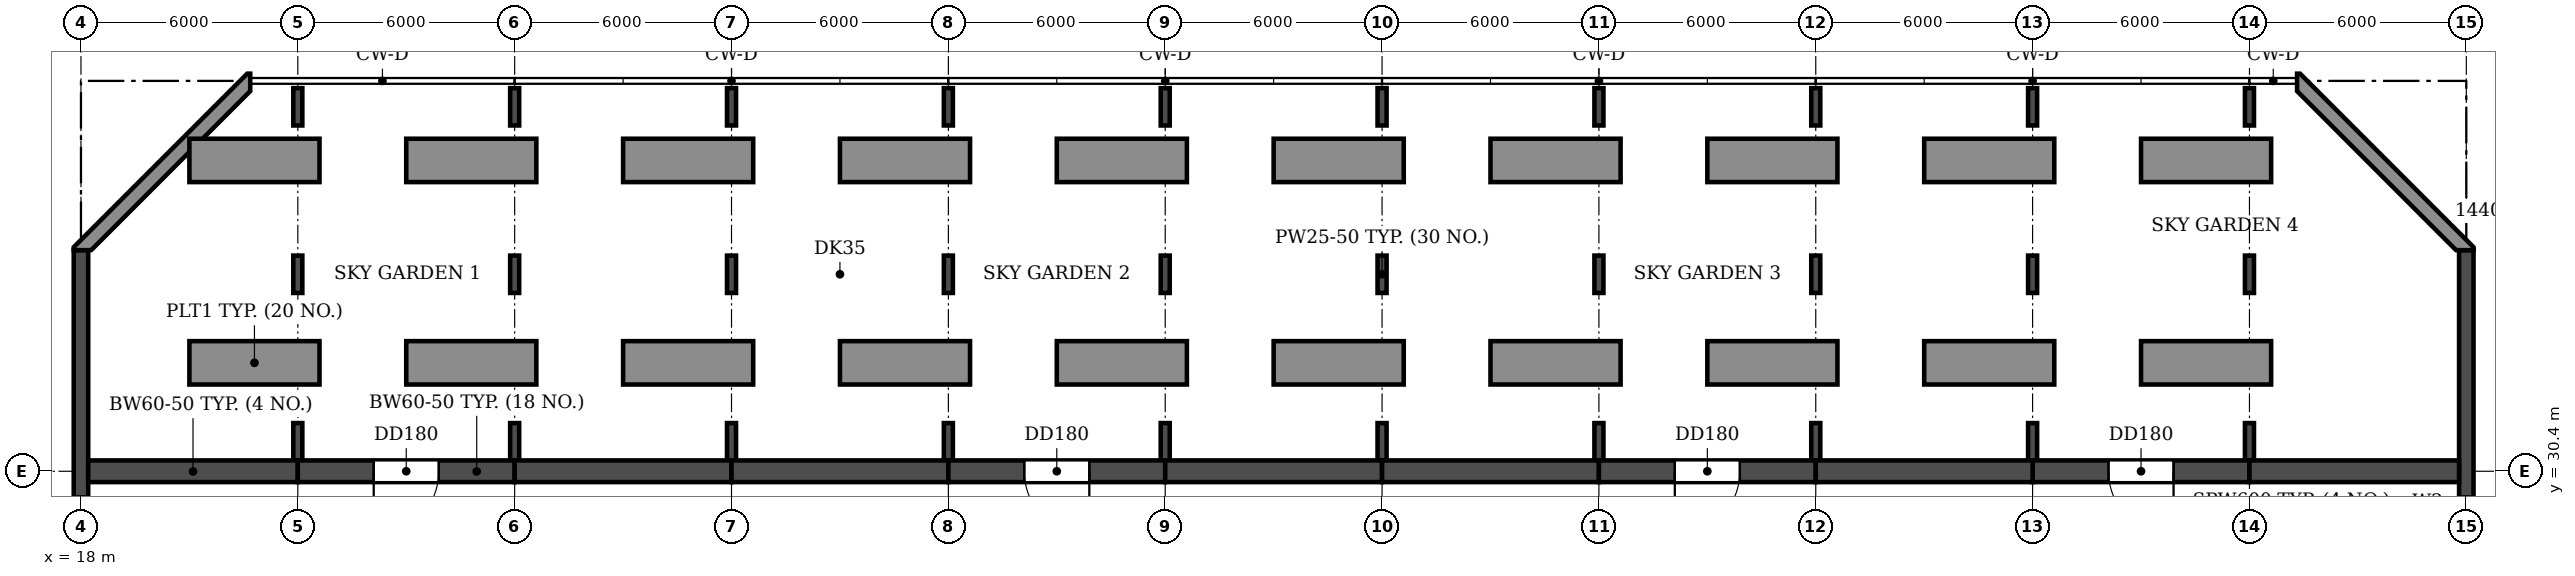
"""IFC4 building model, lengths in metres.
Left out: names, types, materials, properties, quantities, classifications, styles, units other than length and angle.
Written with IfcOpenShell. Run it as: python <this file> out.ifc"""

import sys

from ifc_helpers import new_model, si_unit, direction, frame, frame_2d, origin, place, context, subcontext, project, spatial, polyline, rectangle, outline, extrude, source, transform, mapped, element, fill, save


model = new_model("IFC4")
c1 = context("Model", 3, precision=1e-05, world=origin(), true_north=direction((0.0, 1.0)))
c2 = subcontext(c1, "Body", "Model", "MODEL_VIEW")
j1 = project(units=[si_unit("LENGTHUNIT", "METRE"), si_unit("PLANEANGLEUNIT", "RADIAN")], contexts=[c1])
p1 = place(None, origin())
s1 = spatial("IfcSite", under=j1, at=p1, CompositionType="ELEMENT")
p2 = place(p1, origin())
s2 = spatial("IfcBuilding", under=s1, at=p2, CompositionType="ELEMENT")
p3 = place(p2, frame((0.0, 0.0, 214.8)))
s3 = spatial("IfcBuildingStorey", under=s2, at=p3, CompositionType="ELEMENT", Elevation=214.8)
for number, where, z_axis, x_axis in (
    (1, (24.0, 30.7, 0.0), (0.0, 0.0, 1.0), (0.0, 1.0, 0.0)),
    (2, (24.0, 35.333, 0.0), (0.0, 0.0, 1.0), (0.0, 1.0, 0.0)),
):
    element("IfcWall", number, at=place(p3, frame(where, z_axis=z_axis, x_axis=x_axis)), inside=s3, PredefinedType="SHEAR", context=c2, shape_type="SweptSolid", body=[
        extrude(rectangle(XDim=1.033, YDim=0.25, at=frame_2d((0.517, 0.0))), origin(), (0.0, 0.0, 1.0), 6.38),
    ])
p4 = place(p3, frame((24.0, 39.967, 0.0), z_axis=(0.0, 0.0, 1.0), x_axis=(0.0, 1.0, 0.0)))
e3 = element("IfcWall", 3, at=p4, inside=s3, PredefinedType="SHEAR", context=c2, shape_type="SweptSolid", body=[
    extrude(rectangle(XDim=1.033, YDim=0.25, at=frame_2d((0.517, 0.0))), origin(), (0.0, 0.0, 1.0), 6.38),
])
for number, where, z_axis, x_axis in (
    (4, (30.0, 30.7, 0.0), (0.0, 0.0, 1.0), (0.0, 1.0, 0.0)),
    (5, (30.0, 35.333, 0.0), (0.0, 0.0, 1.0), (0.0, 1.0, 0.0)),
):
    element("IfcWall", number, at=place(p3, frame(where, z_axis=z_axis, x_axis=x_axis)), inside=s3, PredefinedType="SHEAR", context=c2, shape_type="SweptSolid", body=[
        extrude(rectangle(XDim=1.033, YDim=0.25, at=frame_2d((0.517, 0.0))), origin(), (0.0, 0.0, 1.0), 6.38),
    ])
p5 = place(p3, frame((30.0, 39.967, 0.0), z_axis=(0.0, 0.0, 1.0), x_axis=(0.0, 1.0, 0.0)))
e6 = element("IfcWall", 6, at=p5, inside=s3, PredefinedType="SHEAR", context=c2, shape_type="SweptSolid", body=[
    extrude(rectangle(XDim=1.033, YDim=0.25, at=frame_2d((0.517, 0.0))), origin(), (0.0, 0.0, 1.0), 6.38),
])
for number, where, z_axis, x_axis in (
    (7, (36.0, 30.7, 0.0), (0.0, 0.0, 1.0), (0.0, 1.0, 0.0)),
    (8, (36.0, 35.333, 0.0), (0.0, 0.0, 1.0), (0.0, 1.0, 0.0)),
):
    element("IfcWall", number, at=place(p3, frame(where, z_axis=z_axis, x_axis=x_axis)), inside=s3, PredefinedType="SHEAR", context=c2, shape_type="SweptSolid", body=[
        extrude(rectangle(XDim=1.033, YDim=0.25, at=frame_2d((0.517, 0.0))), origin(), (0.0, 0.0, 1.0), 6.38),
    ])
p6 = place(p3, frame((36.0, 39.967, 0.0), z_axis=(0.0, 0.0, 1.0), x_axis=(0.0, 1.0, 0.0)))
e9 = element("IfcWall", 9, at=p6, inside=s3, PredefinedType="SHEAR", context=c2, shape_type="SweptSolid", body=[
    extrude(rectangle(XDim=1.033, YDim=0.25, at=frame_2d((0.517, 0.0))), origin(), (0.0, 0.0, 1.0), 6.38),
])
for number, where, z_axis, x_axis in (
    (10, (42.0, 30.7, 0.0), (0.0, 0.0, 1.0), (0.0, 1.0, 0.0)),
    (11, (42.0, 35.333, 0.0), (0.0, 0.0, 1.0), (0.0, 1.0, 0.0)),
):
    element("IfcWall", number, at=place(p3, frame(where, z_axis=z_axis, x_axis=x_axis)), inside=s3, PredefinedType="SHEAR", context=c2, shape_type="SweptSolid", body=[
        extrude(rectangle(XDim=1.033, YDim=0.25, at=frame_2d((0.517, 0.0))), origin(), (0.0, 0.0, 1.0), 6.38),
    ])
p7 = place(p3, frame((42.0, 39.967, 0.0), z_axis=(0.0, 0.0, 1.0), x_axis=(0.0, 1.0, 0.0)))
e12 = element("IfcWall", 12, at=p7, inside=s3, PredefinedType="SHEAR", context=c2, shape_type="SweptSolid", body=[
    extrude(rectangle(XDim=1.033, YDim=0.25, at=frame_2d((0.517, 0.0))), origin(), (0.0, 0.0, 1.0), 6.38),
])
for number, where, z_axis, x_axis in (
    (13, (48.0, 30.7, 0.0), (0.0, 0.0, 1.0), (0.0, 1.0, 0.0)),
    (14, (48.0, 35.333, 0.0), (0.0, 0.0, 1.0), (0.0, 1.0, 0.0)),
):
    element("IfcWall", number, at=place(p3, frame(where, z_axis=z_axis, x_axis=x_axis)), inside=s3, PredefinedType="SHEAR", context=c2, shape_type="SweptSolid", body=[
        extrude(rectangle(XDim=1.033, YDim=0.25, at=frame_2d((0.517, 0.0))), origin(), (0.0, 0.0, 1.0), 6.38),
    ])
p8 = place(p3, frame((48.0, 39.967, 0.0), z_axis=(0.0, 0.0, 1.0), x_axis=(0.0, 1.0, 0.0)))
e15 = element("IfcWall", 15, at=p8, inside=s3, PredefinedType="SHEAR", context=c2, shape_type="SweptSolid", body=[
    extrude(rectangle(XDim=1.033, YDim=0.25, at=frame_2d((0.517, 0.0))), origin(), (0.0, 0.0, 1.0), 6.38),
])
for number, where, z_axis, x_axis in (
    (16, (54.0, 30.7, 0.0), (0.0, 0.0, 1.0), (0.0, 1.0, 0.0)),
    (17, (54.0, 35.333, 0.0), (0.0, 0.0, 1.0), (0.0, 1.0, 0.0)),
):
    element("IfcWall", number, at=place(p3, frame(where, z_axis=z_axis, x_axis=x_axis)), inside=s3, PredefinedType="SHEAR", context=c2, shape_type="SweptSolid", body=[
        extrude(rectangle(XDim=1.033, YDim=0.25, at=frame_2d((0.517, 0.0))), origin(), (0.0, 0.0, 1.0), 6.38),
    ])
p9 = place(p3, frame((54.0, 39.967, 0.0), z_axis=(0.0, 0.0, 1.0), x_axis=(0.0, 1.0, 0.0)))
e18 = element("IfcWall", 18, at=p9, inside=s3, PredefinedType="SHEAR", context=c2, shape_type="SweptSolid", body=[
    extrude(rectangle(XDim=1.033, YDim=0.25, at=frame_2d((0.517, 0.0))), origin(), (0.0, 0.0, 1.0), 6.38),
])
for number, where, z_axis, x_axis in (
    (19, (60.0, 30.7, 0.0), (0.0, 0.0, 1.0), (0.0, 1.0, 0.0)),
    (20, (60.0, 35.333, 0.0), (0.0, 0.0, 1.0), (0.0, 1.0, 0.0)),
):
    element("IfcWall", number, at=place(p3, frame(where, z_axis=z_axis, x_axis=x_axis)), inside=s3, PredefinedType="SHEAR", context=c2, shape_type="SweptSolid", body=[
        extrude(rectangle(XDim=1.033, YDim=0.25, at=frame_2d((0.517, 0.0))), origin(), (0.0, 0.0, 1.0), 6.38),
    ])
p10 = place(p3, frame((60.0, 39.967, 0.0), z_axis=(0.0, 0.0, 1.0), x_axis=(0.0, 1.0, 0.0)))
e21 = element("IfcWall", 21, at=p10, inside=s3, PredefinedType="SHEAR", context=c2, shape_type="SweptSolid", body=[
    extrude(rectangle(XDim=1.033, YDim=0.25, at=frame_2d((0.517, 0.0))), origin(), (0.0, 0.0, 1.0), 6.38),
])
for number, where, z_axis, x_axis in (
    (22, (66.0, 30.7, 0.0), (0.0, 0.0, 1.0), (0.0, 1.0, 0.0)),
    (23, (66.0, 35.333, 0.0), (0.0, 0.0, 1.0), (0.0, 1.0, 0.0)),
):
    element("IfcWall", number, at=place(p3, frame(where, z_axis=z_axis, x_axis=x_axis)), inside=s3, PredefinedType="SHEAR", context=c2, shape_type="SweptSolid", body=[
        extrude(rectangle(XDim=1.033, YDim=0.25, at=frame_2d((0.517, 0.0))), origin(), (0.0, 0.0, 1.0), 6.38),
    ])
p11 = place(p3, frame((66.0, 39.967, 0.0), z_axis=(0.0, 0.0, 1.0), x_axis=(0.0, 1.0, 0.0)))
e24 = element("IfcWall", 24, at=p11, inside=s3, PredefinedType="SHEAR", context=c2, shape_type="SweptSolid", body=[
    extrude(rectangle(XDim=1.033, YDim=0.25, at=frame_2d((0.517, 0.0))), origin(), (0.0, 0.0, 1.0), 6.38),
])
for number, where, z_axis, x_axis in (
    (25, (72.0, 30.7, 0.0), (0.0, 0.0, 1.0), (0.0, 1.0, 0.0)),
    (26, (72.0, 35.333, 0.0), (0.0, 0.0, 1.0), (0.0, 1.0, 0.0)),
):
    element("IfcWall", number, at=place(p3, frame(where, z_axis=z_axis, x_axis=x_axis)), inside=s3, PredefinedType="SHEAR", context=c2, shape_type="SweptSolid", body=[
        extrude(rectangle(XDim=1.033, YDim=0.25, at=frame_2d((0.517, 0.0))), origin(), (0.0, 0.0, 1.0), 6.38),
    ])
p12 = place(p3, frame((72.0, 39.967, 0.0), z_axis=(0.0, 0.0, 1.0), x_axis=(0.0, 1.0, 0.0)))
e27 = element("IfcWall", 27, at=p12, inside=s3, PredefinedType="SHEAR", context=c2, shape_type="SweptSolid", body=[
    extrude(rectangle(XDim=1.033, YDim=0.25, at=frame_2d((0.517, 0.0))), origin(), (0.0, 0.0, 1.0), 6.38),
])
for number, where, z_axis, x_axis in (
    (28, (78.0, 30.7, 0.0), (0.0, 0.0, 1.0), (0.0, 1.0, 0.0)),
    (29, (78.0, 35.333, 0.0), (0.0, 0.0, 1.0), (0.0, 1.0, 0.0)),
):
    element("IfcWall", number, at=place(p3, frame(where, z_axis=z_axis, x_axis=x_axis)), inside=s3, PredefinedType="SHEAR", context=c2, shape_type="SweptSolid", body=[
        extrude(rectangle(XDim=1.033, YDim=0.25, at=frame_2d((0.517, 0.0))), origin(), (0.0, 0.0, 1.0), 6.38),
    ])
p13 = place(p3, frame((78.0, 39.967, 0.0), z_axis=(0.0, 0.0, 1.0), x_axis=(0.0, 1.0, 0.0)))
e30 = element("IfcWall", 30, at=p13, inside=s3, PredefinedType="SHEAR", context=c2, shape_type="SweptSolid", body=[
    extrude(rectangle(XDim=1.033, YDim=0.25, at=frame_2d((0.517, 0.0))), origin(), (0.0, 0.0, 1.0), 6.38),
])
p14 = place(p3, frame((18.0, 4.683, 0.0), z_axis=(0.0, 0.0, 1.0), x_axis=(0.0, 1.0, 0.0)))
e31 = element("IfcWall", 31, at=p14, inside=s3, PredefinedType="SHEAR", context=c2, shape_type="SweptSolid", body=[
    extrude(rectangle(XDim=31.834, YDim=0.4, at=frame_2d((15.917, 0.0))), origin(), (0.0, 0.0, 1.0), 6.38),
])
p15 = place(p14, frame((23.817, 0.0, 0.9)))
e32 = element("IfcOpeningElement", 32, at=p15, cuts=e31, PredefinedType="OPENING", context=c2, shape_type="SweptSolid", body=[
    extrude(rectangle(XDim=1.2, YDim=1.5, at=frame_2d((0.6, 0.75))), frame((0.0, 0.21, 0.0), z_axis=(0.0, -1.0, 0.0), x_axis=(1.0, 0.0, 0.0)), (0.0, 0.0, 1.0), 0.42),
])
p16 = place(p14, frame((8.017, 0.0, 0.9)))
e33 = element("IfcOpeningElement", 33, at=p16, cuts=e31, PredefinedType="OPENING", context=c2, shape_type="SweptSolid", body=[
    extrude(rectangle(XDim=1.2, YDim=1.5, at=frame_2d((0.6, 0.75))), frame((0.0, 0.21, 0.0), z_axis=(0.0, -1.0, 0.0), x_axis=(1.0, 0.0, 0.0)), (0.0, 0.0, 1.0), 0.42),
])
p17 = place(p14, frame((15.917, 0.0, 0.9)))
e34 = element("IfcOpeningElement", 34, at=p17, cuts=e31, PredefinedType="OPENING", context=c2, shape_type="SweptSolid", body=[
    extrude(rectangle(XDim=1.2, YDim=1.5, at=frame_2d((0.6, 0.75))), frame((0.0, 0.21, 0.0), z_axis=(0.0, -1.0, 0.0), x_axis=(1.0, 0.0, 0.0)), (0.0, 0.0, 1.0), 0.42),
])
p18 = place(p3, frame((84.0, 4.683, 0.0), z_axis=(0.0, 0.0, 1.0), x_axis=(0.0, 1.0, 0.0)))
e35 = element("IfcWall", 35, at=p18, inside=s3, PredefinedType="SHEAR", context=c2, shape_type="SweptSolid", body=[
    extrude(rectangle(XDim=31.834, YDim=0.4, at=frame_2d((15.917, 0.0))), origin(), (0.0, 0.0, 1.0), 6.38),
])
p19 = place(p18, frame((23.817, 0.0, 0.9)))
e36 = element("IfcOpeningElement", 36, at=p19, cuts=e35, PredefinedType="OPENING", context=c2, shape_type="SweptSolid", body=[
    extrude(rectangle(XDim=1.2, YDim=1.5, at=frame_2d((0.6, 0.75))), frame((0.0, 0.21, 0.0), z_axis=(0.0, -1.0, 0.0), x_axis=(1.0, 0.0, 0.0)), (0.0, 0.0, 1.0), 0.42),
])
p20 = place(p18, frame((8.017, 0.0, 0.9)))
e37 = element("IfcOpeningElement", 37, at=p20, cuts=e35, PredefinedType="OPENING", context=c2, shape_type="SweptSolid", body=[
    extrude(rectangle(XDim=1.2, YDim=1.5, at=frame_2d((0.6, 0.75))), frame((0.0, 0.21, 0.0), z_axis=(0.0, -1.0, 0.0), x_axis=(1.0, 0.0, 0.0)), (0.0, 0.0, 1.0), 0.42),
])
p21 = place(p18, frame((15.917, 0.0, 0.9)))
e38 = element("IfcOpeningElement", 38, at=p21, cuts=e35, PredefinedType="OPENING", context=c2, shape_type="SweptSolid", body=[
    extrude(rectangle(XDim=1.2, YDim=1.5, at=frame_2d((0.6, 0.75))), frame((0.0, 0.21, 0.0), z_axis=(0.0, -1.0, 0.0), x_axis=(1.0, 0.0, 0.0)), (0.0, 0.0, 1.0), 0.42),
])
p22 = place(p3, frame((18.2, 30.4, 0.0), z_axis=(0.0, 0.0, 1.0), x_axis=(1.0, 0.0, 0.0)))
e39 = element("IfcWall", 39, at=p22, inside=s3, PredefinedType="SHEAR", context=c2, shape_type="SweptSolid", body=[
    extrude(rectangle(XDim=5.8, YDim=0.6, at=frame_2d((2.9, 0.0))), origin(), (0.0, 0.0, 1.0), 6.38),
])
p23 = place(p3, frame((24.0, 30.4, 0.0), z_axis=(0.0, 0.0, 1.0), x_axis=(1.0, 0.0, 0.0)))
e40 = element("IfcWall", 40, at=p23, inside=s3, PredefinedType="SHEAR", context=c2, shape_type="SweptSolid", body=[
    extrude(rectangle(XDim=6.0, YDim=0.6, at=frame_2d((3.0, 0.0))), origin(), (0.0, 0.0, 1.0), 6.38),
])
p24 = place(p23, frame((2.1, 0.0, 0.0)))
e41 = element("IfcOpeningElement", 41, at=p24, cuts=e40, PredefinedType="OPENING", context=c2, shape_type="SweptSolid", body=[
    extrude(rectangle(XDim=1.8, YDim=2.1, at=frame_2d((0.9, 1.05))), frame((0.0, 0.31, 0.0), z_axis=(0.0, -1.0, 0.0), x_axis=(1.0, 0.0, 0.0)), (0.0, 0.0, 1.0), 0.62),
])
for number, where, z_axis, x_axis in (
    (42, (30.0, 30.4, 0.0), (0.0, 0.0, 1.0), (1.0, 0.0, 0.0)),
    (43, (36.0, 30.4, 0.0), (0.0, 0.0, 1.0), (1.0, 0.0, 0.0)),
):
    element("IfcWall", number, at=place(p3, frame(where, z_axis=z_axis, x_axis=x_axis)), inside=s3, PredefinedType="SHEAR", context=c2, shape_type="SweptSolid", body=[
        extrude(rectangle(XDim=6.0, YDim=0.6, at=frame_2d((3.0, 0.0))), origin(), (0.0, 0.0, 1.0), 6.38),
    ])
p25 = place(p3, frame((42.0, 30.4, 0.0), z_axis=(0.0, 0.0, 1.0), x_axis=(1.0, 0.0, 0.0)))
e44 = element("IfcWall", 44, at=p25, inside=s3, PredefinedType="SHEAR", context=c2, shape_type="SweptSolid", body=[
    extrude(rectangle(XDim=6.0, YDim=0.6, at=frame_2d((3.0, 0.0))), origin(), (0.0, 0.0, 1.0), 6.38),
])
p26 = place(p25, frame((2.1, 0.0, 0.0)))
e45 = element("IfcOpeningElement", 45, at=p26, cuts=e44, PredefinedType="OPENING", context=c2, shape_type="SweptSolid", body=[
    extrude(rectangle(XDim=1.8, YDim=2.1, at=frame_2d((0.9, 1.05))), frame((0.0, 0.31, 0.0), z_axis=(0.0, -1.0, 0.0), x_axis=(1.0, 0.0, 0.0)), (0.0, 0.0, 1.0), 0.62),
])
for number, where, z_axis, x_axis in (
    (46, (48.0, 30.4, 0.0), (0.0, 0.0, 1.0), (1.0, 0.0, 0.0)),
    (47, (54.0, 30.4, 0.0), (0.0, 0.0, 1.0), (1.0, 0.0, 0.0)),
):
    element("IfcWall", number, at=place(p3, frame(where, z_axis=z_axis, x_axis=x_axis)), inside=s3, PredefinedType="SHEAR", context=c2, shape_type="SweptSolid", body=[
        extrude(rectangle(XDim=6.0, YDim=0.6, at=frame_2d((3.0, 0.0))), origin(), (0.0, 0.0, 1.0), 6.38),
    ])
p27 = place(p3, frame((60.0, 30.4, 0.0), z_axis=(0.0, 0.0, 1.0), x_axis=(1.0, 0.0, 0.0)))
e48 = element("IfcWall", 48, at=p27, inside=s3, PredefinedType="SHEAR", context=c2, shape_type="SweptSolid", body=[
    extrude(rectangle(XDim=6.0, YDim=0.6, at=frame_2d((3.0, 0.0))), origin(), (0.0, 0.0, 1.0), 6.38),
])
p28 = place(p27, frame((2.1, 0.0, 0.0)))
e49 = element("IfcOpeningElement", 49, at=p28, cuts=e48, PredefinedType="OPENING", context=c2, shape_type="SweptSolid", body=[
    extrude(rectangle(XDim=1.8, YDim=2.1, at=frame_2d((0.9, 1.05))), frame((0.0, 0.31, 0.0), z_axis=(0.0, -1.0, 0.0), x_axis=(1.0, 0.0, 0.0)), (0.0, 0.0, 1.0), 0.62),
])
p29 = place(p3, frame((66.0, 30.4, 0.0), z_axis=(0.0, 0.0, 1.0), x_axis=(1.0, 0.0, 0.0)))
e50 = element("IfcWall", 50, at=p29, inside=s3, PredefinedType="SHEAR", context=c2, shape_type="SweptSolid", body=[
    extrude(rectangle(XDim=6.0, YDim=0.6, at=frame_2d((3.0, 0.0))), origin(), (0.0, 0.0, 1.0), 6.38),
])
p30 = place(p3, frame((72.0, 30.4, 0.0), z_axis=(0.0, 0.0, 1.0), x_axis=(1.0, 0.0, 0.0)))
e51 = element("IfcWall", 51, at=p30, inside=s3, PredefinedType="SHEAR", context=c2, shape_type="SweptSolid", body=[
    extrude(rectangle(XDim=6.0, YDim=0.6, at=frame_2d((3.0, 0.0))), origin(), (0.0, 0.0, 1.0), 6.38),
])
p31 = place(p30, frame((2.1, 0.0, 0.0)))
e52 = element("IfcOpeningElement", 52, at=p31, cuts=e51, PredefinedType="OPENING", context=c2, shape_type="SweptSolid", body=[
    extrude(rectangle(XDim=1.8, YDim=2.1, at=frame_2d((0.9, 1.05))), frame((0.0, 0.31, 0.0), z_axis=(0.0, -1.0, 0.0), x_axis=(1.0, 0.0, 0.0)), (0.0, 0.0, 1.0), 0.62),
])
p32 = place(p3, frame((78.0, 30.4, 0.0), z_axis=(0.0, 0.0, 1.0), x_axis=(1.0, 0.0, 0.0)))
e53 = element("IfcWall", 53, at=p32, inside=s3, PredefinedType="SHEAR", context=c2, shape_type="SweptSolid", body=[
    extrude(rectangle(XDim=5.8, YDim=0.6, at=frame_2d((2.9, 0.0))), origin(), (0.0, 0.0, 1.0), 6.38),
])
p33 = place(p3, origin())
e54 = element("IfcWall", 54, at=p33, inside=s3, PredefinedType="STANDARD", context=c2, shape_type="SweptSolid", body=[
    extrude(outline(polyline([(84.2, 36.517), (84.2, 36.6), (79.4, 41.4), (79.317, 41.4), (79.317, 40.917), (83.717, 36.517), (84.2, 36.517)])), origin(), (0.0, 0.0, 1.0), 6.38),
])
p34 = place(p3, origin())
e55 = element("IfcWall", 55, at=p34, inside=s3, PredefinedType="STANDARD", context=c2, shape_type="SweptSolid", body=[
    extrude(outline(polyline([(22.683, 41.4), (22.6, 41.4), (17.8, 36.6), (17.8, 36.517), (18.283, 36.517), (22.683, 40.917), (22.683, 41.4)])), origin(), (0.0, 0.0, 1.0), 6.38),
])
m1 = source(origin(), c2, "Body", "SweptSolid", [
    extrude(outline(polyline([(0.0, 0.0), (3.6, 0.0), (3.6, 1.2), (0.0, 1.2), (0.0, 0.0)])), origin(), (0.0, 0.0, 1.0), 0.6),
])
for number, where in (
    (56, (21.0, 32.8, 0.0)),
    (57, (27.0, 32.8, 0.0)),
    (58, (33.0, 32.8, 0.0)),
    (59, (39.0, 32.8, 0.0)),
    (60, (45.0, 32.8, 0.0)),
    (61, (51.0, 32.8, 0.0)),
    (62, (57.0, 32.8, 0.0)),
    (63, (63.0, 32.8, 0.0)),
    (64, (69.0, 32.8, 0.0)),
    (65, (75.0, 32.8, 0.0)),
):
    element("IfcWall", number, at=place(p3, frame(where)), inside=s3, PredefinedType="USERDEFINED", context=c2, shape_type="MappedRepresentation", body=[
        mapped(m1, transform((0.0, 0.0, 0.0))),
    ])
m2 = source(origin(), c2, "Body", "SweptSolid", [
    extrude(outline(polyline([(0.0, 0.0), (3.6, 0.0), (3.6, 1.2), (0.0, 1.2), (0.0, 0.0)])), origin(), (0.0, 0.0, 1.0), 0.6),
])
for number, where in (
    (66, (21.0, 38.4, 0.0)),
    (67, (27.0, 38.4, 0.0)),
    (68, (33.0, 38.4, 0.0)),
    (69, (39.0, 38.4, 0.0)),
    (70, (45.0, 38.4, 0.0)),
    (71, (51.0, 38.4, 0.0)),
    (72, (57.0, 38.4, 0.0)),
    (73, (63.0, 38.4, 0.0)),
    (74, (69.0, 38.4, 0.0)),
    (75, (75.0, 38.4, 0.0)),
):
    element("IfcWall", number, at=place(p3, frame(where)), inside=s3, PredefinedType="USERDEFINED", context=c2, shape_type="MappedRepresentation", body=[
        mapped(m2, transform((0.0, 0.0, 0.0))),
    ])
p35 = place(p19, origin())
e76 = element("IfcWindow", 76, at=p35, inside=s3, PartitioningType="SINGLE_PANEL", PredefinedType="WINDOW", context=c2, shape_type="SweptSolid", body=[
    extrude(rectangle(XDim=1.2, YDim=1.5, at=frame_2d((0.6, 0.75))), frame((0.0, 0.03, 0.0), z_axis=(0.0, -1.0, 0.0), x_axis=(1.0, 0.0, 0.0)), (0.0, 0.0, 1.0), 0.06),
])
fill(e36, e76)
p36 = place(p15, origin())
e77 = element("IfcWindow", 77, at=p36, inside=s3, PartitioningType="SINGLE_PANEL", PredefinedType="WINDOW", context=c2, shape_type="SweptSolid", body=[
    extrude(rectangle(XDim=1.2, YDim=1.5, at=frame_2d((0.6, 0.75))), frame((0.0, 0.03, 0.0), z_axis=(0.0, -1.0, 0.0), x_axis=(1.0, 0.0, 0.0)), (0.0, 0.0, 1.0), 0.06),
])
fill(e32, e77)
p37 = place(p24, frame((1.8, 0.0, 0.0), z_axis=(0.0, 0.0, 1.0), x_axis=(-1.0, 0.0, 0.0)))
e78 = element("IfcDoor", 78, at=p37, inside=s3, OperationType="DOUBLE_DOOR_SINGLE_SWING", PredefinedType="DOOR", context=c2, shape_type="SweptSolid", body=[
    extrude(rectangle(XDim=1.8, YDim=2.1, at=frame_2d((0.9, 1.05))), frame((0.0, 0.025, 0.0), z_axis=(0.0, -1.0, 0.0), x_axis=(1.0, 0.0, 0.0)), (0.0, 0.0, 1.0), 0.05),
])
fill(e41, e78)
p38 = place(p26, frame((1.8, 0.0, 0.0), z_axis=(0.0, 0.0, 1.0), x_axis=(-1.0, 0.0, 0.0)))
e79 = element("IfcDoor", 79, at=p38, inside=s3, OperationType="DOUBLE_DOOR_SINGLE_SWING", PredefinedType="DOOR", context=c2, shape_type="SweptSolid", body=[
    extrude(rectangle(XDim=1.8, YDim=2.1, at=frame_2d((0.9, 1.05))), frame((0.0, 0.025, 0.0), z_axis=(0.0, -1.0, 0.0), x_axis=(1.0, 0.0, 0.0)), (0.0, 0.0, 1.0), 0.05),
])
fill(e45, e79)
p39 = place(p28, frame((1.8, 0.0, 0.0), z_axis=(0.0, 0.0, 1.0), x_axis=(-1.0, 0.0, 0.0)))
e80 = element("IfcDoor", 80, at=p39, inside=s3, OperationType="DOUBLE_DOOR_SINGLE_SWING", PredefinedType="DOOR", context=c2, shape_type="SweptSolid", body=[
    extrude(rectangle(XDim=1.8, YDim=2.1, at=frame_2d((0.9, 1.05))), frame((0.0, 0.025, 0.0), z_axis=(0.0, -1.0, 0.0), x_axis=(1.0, 0.0, 0.0)), (0.0, 0.0, 1.0), 0.05),
])
fill(e49, e80)
p40 = place(p31, frame((1.8, 0.0, 0.0), z_axis=(0.0, 0.0, 1.0), x_axis=(-1.0, 0.0, 0.0)))
e81 = element("IfcDoor", 81, at=p40, inside=s3, OperationType="DOUBLE_DOOR_SINGLE_SWING", PredefinedType="DOOR", context=c2, shape_type="SweptSolid", body=[
    extrude(rectangle(XDim=1.8, YDim=2.1, at=frame_2d((0.9, 1.05))), frame((0.0, 0.025, 0.0), z_axis=(0.0, -1.0, 0.0), x_axis=(1.0, 0.0, 0.0)), (0.0, 0.0, 1.0), 0.05),
])
fill(e52, e81)
save(model, sys.argv[1])
